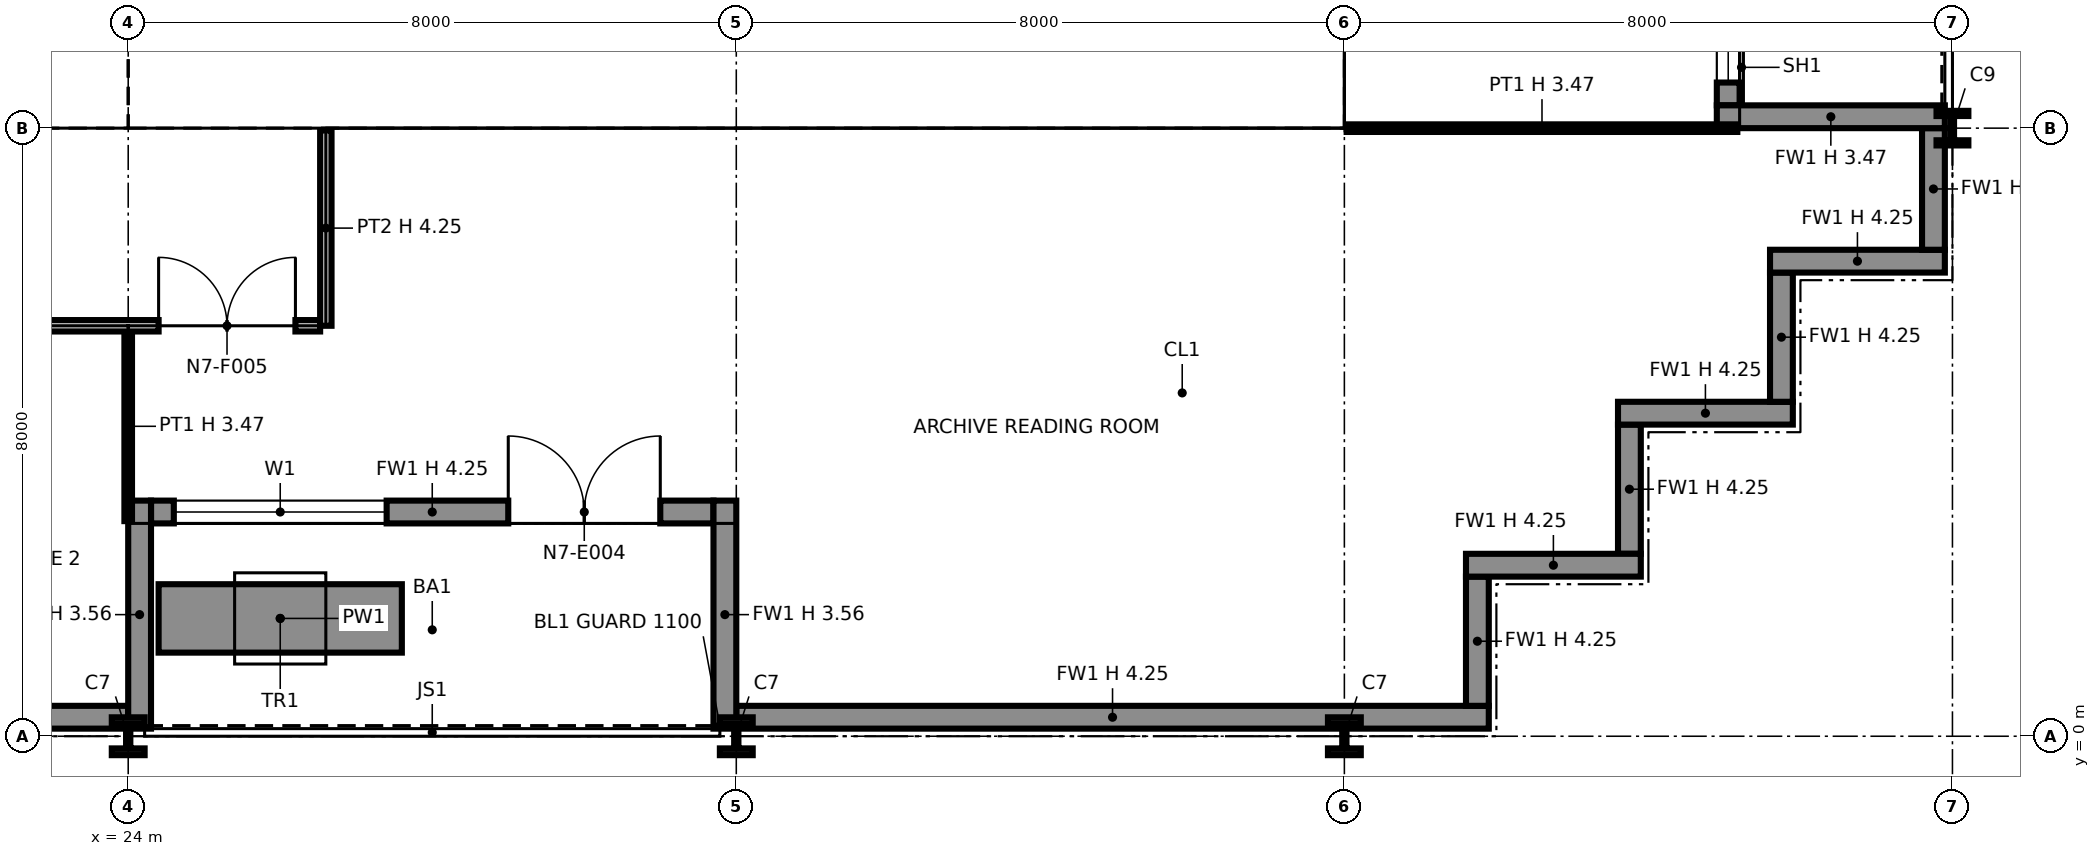
"""IFC4 building model, lengths in metres.
Left out: names, types, materials, properties, quantities, classifications, styles, units other than length and angle.
Written with IfcOpenShell. Run it as: python <this file> out.ifc"""

import sys

from ifc_helpers import new_model, si_unit, direction, frame, frame_2d, origin, origin_2d, place, context, subcontext, project, spatial, polyline, rectangle, i_section, outline, extrude, element, fill, save


model = new_model("IFC4")
c1 = context("Model", 3, precision=1e-05, world=origin(), true_north=direction((0.0, 1.0)))
c2 = subcontext(c1, "Body", "Model", "MODEL_VIEW")
j1 = project(units=[si_unit("LENGTHUNIT", "METRE"), si_unit("PLANEANGLEUNIT", "RADIAN")], contexts=[c1])
p1 = place(None, origin())
s1 = spatial("IfcSite", under=j1, at=p1, CompositionType="ELEMENT")
p2 = place(p1, origin())
s2 = spatial("IfcBuilding", under=s1, at=p2, CompositionType="ELEMENT")
p3 = place(p2, frame((0.0, 0.0, 105.2)))
s3 = spatial("IfcBuildingStorey", under=s2, at=p3, CompositionType="ELEMENT", Elevation=105.2)
p4 = place(p3, frame((24.0, 0.0, 0.0), z_axis=(0.0, 0.0, 1.0), x_axis=(1.0, 0.0, 0.0)))
e1 = element("IfcColumn", 1, at=p4, inside=s3, PredefinedType="COLUMN", context=c2, shape_type="SweptSolid", body=[
    extrude(i_section(OverallWidth=0.432, OverallDepth=0.498, WebThickness=0.056, FlangeThickness=0.089, at=origin_2d()), origin(), (0.0, 0.0, 1.0), 4.25),
])
p5 = place(p3, frame((24.0, 8.0, 0.0), z_axis=(0.0, 0.0, 1.0), x_axis=(1.0, 0.0, 0.0)))
e2 = element("IfcColumn", 2, at=p5, inside=s3, PredefinedType="COLUMN", context=c2, shape_type="SweptSolid", body=[
    extrude(i_section(OverallWidth=0.411, OverallDepth=0.434, WebThickness=0.036, FlangeThickness=0.057, at=origin_2d()), origin(), (0.0, 0.0, 1.0), 4.25),
])
p6 = place(p3, frame((32.0, 0.0, 0.0), z_axis=(0.0, 0.0, 1.0), x_axis=(1.0, 0.0, 0.0)))
e3 = element("IfcColumn", 3, at=p6, inside=s3, PredefinedType="COLUMN", context=c2, shape_type="SweptSolid", body=[
    extrude(i_section(OverallWidth=0.432, OverallDepth=0.498, WebThickness=0.056, FlangeThickness=0.089, at=origin_2d()), origin(), (0.0, 0.0, 1.0), 4.25),
])
p7 = place(p3, frame((32.0, 8.0, 0.0), z_axis=(0.0, 0.0, 1.0), x_axis=(1.0, 0.0, 0.0)))
e4 = element("IfcColumn", 4, at=p7, inside=s3, PredefinedType="COLUMN", context=c2, shape_type="SweptSolid", body=[
    extrude(i_section(OverallWidth=0.406, OverallDepth=0.417, WebThickness=0.03, FlangeThickness=0.048, at=origin_2d()), origin(), (0.0, 0.0, 1.0), 4.25),
])
p8 = place(p3, frame((40.0, 0.0, 0.0), z_axis=(0.0, 0.0, 1.0), x_axis=(1.0, 0.0, 0.0)))
e5 = element("IfcColumn", 5, at=p8, inside=s3, PredefinedType="COLUMN", context=c2, shape_type="SweptSolid", body=[
    extrude(i_section(OverallWidth=0.432, OverallDepth=0.498, WebThickness=0.056, FlangeThickness=0.089, at=origin_2d()), origin(), (0.0, 0.0, 1.0), 4.25),
])
p9 = place(p3, frame((40.0, 8.0, 0.0), z_axis=(0.0, 0.0, 1.0), x_axis=(1.0, 0.0, 0.0)))
e6 = element("IfcColumn", 6, at=p9, inside=s3, PredefinedType="COLUMN", context=c2, shape_type="SweptSolid", body=[
    extrude(i_section(OverallWidth=0.406, OverallDepth=0.417, WebThickness=0.03, FlangeThickness=0.048, at=origin_2d()), origin(), (0.0, 0.0, 1.0), 4.25),
])
p10 = place(p3, frame((48.0, 8.0, 0.0), z_axis=(0.0, 0.0, 1.0), x_axis=(1.0, 0.0, 0.0)))
e7 = element("IfcColumn", 7, at=p10, inside=s3, PredefinedType="COLUMN", context=c2, shape_type="SweptSolid", body=[
    extrude(i_section(OverallWidth=0.419, OverallDepth=0.455, WebThickness=0.042, FlangeThickness=0.068, at=origin_2d()), origin(), (0.0, 0.0, 1.0), 4.25),
])
p11 = place(p3, frame((16.0, 0.25, 0.0), z_axis=(0.0, 0.0, 1.0), x_axis=(1.0, 0.0, 0.0)))
e8 = element("IfcWall", 8, at=p11, inside=s3, PredefinedType="SOLIDWALL", context=c2, shape_type="SweptSolid", body=[
    extrude(rectangle(XDim=8.0, YDim=0.3, at=frame_2d((4.0, 0.0))), origin(), (0.0, 0.0, 1.0), 4.25),
])
p12 = place(p3, frame((24.3, 2.95, 0.0), z_axis=(0.0, 0.0, 1.0), x_axis=(1.0, 0.0, 0.0)))
e9 = element("IfcWall", 9, at=p12, inside=s3, PredefinedType="SOLIDWALL", context=c2, shape_type="SweptSolid", body=[
    extrude(rectangle(XDim=7.4, YDim=0.3, at=frame_2d((3.7, 0.0))), origin(), (0.0, 0.0, 1.0), 4.25),
])
p13 = place(p12, frame((0.3, 0.0, 0.9)))
e10 = element("IfcOpeningElement", 10, at=p13, cuts=e9, PredefinedType="OPENING", context=c2, shape_type="SweptSolid", body=[
    extrude(rectangle(XDim=2.8, YDim=2.2, at=frame_2d((1.4, 1.1))), frame((0.0, 0.16, 0.0), z_axis=(0.0, -1.0, 0.0), x_axis=(1.0, 0.0, 0.0)), (0.0, 0.0, 1.0), 0.32),
])
p14 = place(p12, frame((4.7, 0.0, 0.0)))
e11 = element("IfcOpeningElement", 11, at=p14, cuts=e9, PredefinedType="OPENING", context=c2, shape_type="SweptSolid", body=[
    extrude(rectangle(XDim=2.0, YDim=2.4, at=frame_2d((1.0, 1.2))), frame((0.0, 0.16, 0.0), z_axis=(0.0, -1.0, 0.0), x_axis=(1.0, 0.0, 0.0)), (0.0, 0.0, 1.0), 0.32),
])
for number, where, z_axis, x_axis in (
    (12, (24.15, 0.1, 0.0), (0.0, 0.0, 1.0), (0.0, 1.0, 0.0)),
    (13, (31.85, 0.1, 0.0), (0.0, 0.0, 1.0), (0.0, 1.0, 0.0)),
):
    element("IfcWall", number, at=place(p3, frame(where, z_axis=z_axis, x_axis=x_axis)), inside=s3, PredefinedType="SOLIDWALL", context=c2, shape_type="SweptSolid", body=[
        extrude(rectangle(XDim=3.0, YDim=0.3, at=frame_2d((1.5, 0.0))), origin(), (0.0, 0.0, 1.0), 3.556),
    ])
p15 = place(p3, frame((32.0, 0.25, 0.0), z_axis=(0.0, 0.0, 1.0), x_axis=(1.0, 0.0, 0.0)))
e14 = element("IfcWall", 14, at=p15, inside=s3, PredefinedType="SOLIDWALL", context=c2, shape_type="SweptSolid", body=[
    extrude(rectangle(XDim=9.9, YDim=0.3, at=frame_2d((4.95, 0.0))), origin(), (0.0, 0.0, 1.0), 4.25),
])
p16 = place(p3, frame((24.4, 1.55, 0.0), z_axis=(0.0, 0.0, 1.0), x_axis=(1.0, 0.0, 0.0)))
e15 = element("IfcWall", 15, at=p16, inside=s3, PredefinedType="SOLIDWALL", context=c2, shape_type="SweptSolid", body=[
    extrude(rectangle(XDim=3.2, YDim=0.9, at=frame_2d((1.6, 0.0))), origin(), (0.0, 0.0, 1.0), 0.6),
])
p17 = place(p3, frame((41.75, 0.4, 0.0), z_axis=(0.0, 0.0, 1.0), x_axis=(0.0, 1.0, 0.0)))
e16 = element("IfcWall", 16, at=p17, inside=s3, PredefinedType="SOLIDWALL", context=c2, shape_type="SweptSolid", body=[
    extrude(rectangle(XDim=1.7, YDim=0.3, at=frame_2d((0.85, 0.0))), origin(), (0.0, 0.0, 1.0), 4.25),
])
p18 = place(p3, frame((41.6, 2.25, 0.0), z_axis=(0.0, 0.0, 1.0), x_axis=(1.0, 0.0, 0.0)))
e17 = element("IfcWall", 17, at=p18, inside=s3, PredefinedType="SOLIDWALL", context=c2, shape_type="SweptSolid", body=[
    extrude(rectangle(XDim=2.3, YDim=0.3, at=frame_2d((1.15, 0.0))), origin(), (0.0, 0.0, 1.0), 4.25),
])
p19 = place(p3, frame((43.75, 2.4, 0.0), z_axis=(0.0, 0.0, 1.0), x_axis=(0.0, 1.0, 0.0)))
e18 = element("IfcWall", 18, at=p19, inside=s3, PredefinedType="SOLIDWALL", context=c2, shape_type="SweptSolid", body=[
    extrude(rectangle(XDim=1.7, YDim=0.3, at=frame_2d((0.85, 0.0))), origin(), (0.0, 0.0, 1.0), 4.25),
])
p20 = place(p3, frame((43.6, 4.25, 0.0), z_axis=(0.0, 0.0, 1.0), x_axis=(1.0, 0.0, 0.0)))
e19 = element("IfcWall", 19, at=p20, inside=s3, PredefinedType="SOLIDWALL", context=c2, shape_type="SweptSolid", body=[
    extrude(rectangle(XDim=2.3, YDim=0.3, at=frame_2d((1.15, 0.0))), origin(), (0.0, 0.0, 1.0), 4.25),
])
p21 = place(p3, frame((45.75, 4.4, 0.0), z_axis=(0.0, 0.0, 1.0), x_axis=(0.0, 1.0, 0.0)))
e20 = element("IfcWall", 20, at=p21, inside=s3, PredefinedType="SOLIDWALL", context=c2, shape_type="SweptSolid", body=[
    extrude(rectangle(XDim=1.7, YDim=0.3, at=frame_2d((0.85, 0.0))), origin(), (0.0, 0.0, 1.0), 4.25),
])
p22 = place(p3, frame((45.6, 6.25, 0.0), z_axis=(0.0, 0.0, 1.0), x_axis=(1.0, 0.0, 0.0)))
e21 = element("IfcWall", 21, at=p22, inside=s3, PredefinedType="SOLIDWALL", context=c2, shape_type="SweptSolid", body=[
    extrude(rectangle(XDim=2.3, YDim=0.3, at=frame_2d((1.15, 0.0))), origin(), (0.0, 0.0, 1.0), 4.25),
])
p23 = place(p3, frame((47.75, 6.4, 0.0), z_axis=(0.0, 0.0, 1.0), x_axis=(0.0, 1.0, 0.0)))
e22 = element("IfcWall", 22, at=p23, inside=s3, PredefinedType="SOLIDWALL", context=c2, shape_type="SweptSolid", body=[
    extrude(rectangle(XDim=1.6, YDim=0.3, at=frame_2d((0.8, 0.0))), origin(), (0.0, 0.0, 1.0), 4.25),
])
p24 = place(p3, frame((45.05, 8.3, 0.0), z_axis=(0.0, 0.0, 1.0), x_axis=(0.0, 1.0, 0.0)))
e23 = element("IfcWall", 23, at=p24, inside=s3, PredefinedType="SOLIDWALL", context=c2, shape_type="SweptSolid", body=[
    extrude(rectangle(XDim=7.4, YDim=0.3, at=frame_2d((3.7, 0.0))), origin(), (0.0, 0.0, 1.0), 4.25),
])
p25 = place(p24, frame((0.3, 0.0, 0.9)))
e24 = element("IfcOpeningElement", 24, at=p25, cuts=e23, PredefinedType="OPENING", context=c2, shape_type="SweptSolid", body=[
    extrude(rectangle(XDim=2.8, YDim=2.2, at=frame_2d((1.4, 1.1))), frame((0.0, 0.16, 0.0), z_axis=(0.0, -1.0, 0.0), x_axis=(1.0, 0.0, 0.0)), (0.0, 0.0, 1.0), 0.32),
])
p26 = place(p24, frame((4.7, 0.0, 0.0)))
e25 = element("IfcOpeningElement", 25, at=p26, cuts=e23, PredefinedType="OPENING", context=c2, shape_type="SweptSolid", body=[
    extrude(rectangle(XDim=2.0, YDim=2.4, at=frame_2d((1.0, 1.2))), frame((0.0, 0.16, 0.0), z_axis=(0.0, -1.0, 0.0), x_axis=(1.0, 0.0, 0.0)), (0.0, 0.0, 1.0), 0.32),
])
p27 = place(p3, frame((47.9, 8.15, 0.0), z_axis=(0.0, 0.0, 1.0), x_axis=(-1.0, 0.0, 0.0)))
e26 = element("IfcWall", 26, at=p27, inside=s3, PredefinedType="SOLIDWALL", context=c2, shape_type="SweptSolid", body=[
    extrude(rectangle(XDim=3.0, YDim=0.3, at=frame_2d((1.5, 0.0))), origin(), (0.0, 0.0, 1.0), 3.469),
])
p28 = place(p3, frame((8.65, 8.75, 0.0), z_axis=(0.0, 0.0, 1.0), x_axis=(1.0, 0.0, 0.0)))
e27 = element("IfcWall", 27, at=p28, inside=s3, PredefinedType="PARTITIONING", context=c2, shape_type="SweptSolid", body=[
    extrude(outline(polyline([(0.0, 0.0), (14.7, 0.0), (14.7, 4.25), (7.469, 4.25), (7.469, 3.632), (7.231, 3.632), (7.23, 4.25), (0.0, 4.25), (0.0, 0.0)])), frame((0.0, 0.1, 0.0), z_axis=(0.0, -1.0, 0.0), x_axis=(1.0, 0.0, 0.0)), (0.0, 0.0, 1.0), 0.2),
])
p29 = place(p28, frame((1.3, 0.0, 0.0)))
e28 = element("IfcOpeningElement", 28, at=p29, cuts=e27, PredefinedType="OPENING", context=c2, shape_type="SweptSolid", body=[
    extrude(rectangle(XDim=1.4, YDim=2.1, at=frame_2d((0.7, 1.05))), frame((0.0, 0.11, 0.0), z_axis=(0.0, -1.0, 0.0), x_axis=(1.0, 0.0, 0.0)), (0.0, 0.0, 1.0), 0.22),
])
p30 = place(p28, frame((4.6, 0.0, 0.0)))
e29 = element("IfcOpeningElement", 29, at=p30, cuts=e27, PredefinedType="OPENING", context=c2, shape_type="SweptSolid", body=[
    extrude(rectangle(XDim=1.4, YDim=2.1, at=frame_2d((0.7, 1.05))), frame((0.0, 0.11, 0.0), z_axis=(0.0, -1.0, 0.0), x_axis=(1.0, 0.0, 0.0)), (0.0, 0.0, 1.0), 0.22),
])
p31 = place(p28, frame((10.4, 0.0, 0.0)))
e30 = element("IfcOpeningElement", 30, at=p31, cuts=e27, PredefinedType="OPENING", context=c2, shape_type="SweptSolid", body=[
    extrude(rectangle(XDim=1.2, YDim=2.1, at=frame_2d((0.6, 1.05))), frame((0.0, 0.11, 0.0), z_axis=(0.0, -1.0, 0.0), x_axis=(1.0, 0.0, 0.0)), (0.0, 0.0, 1.0), 0.22),
])
p32 = place(p3, frame((23.25, 8.85, 0.0), z_axis=(0.0, 0.0, 1.0), x_axis=(0.0, 1.0, 0.0)))
e31 = element("IfcWall", 31, at=p32, inside=s3, PredefinedType="PARTITIONING", context=c2, shape_type="SweptSolid", body=[
    extrude(outline(polyline([(0.0, 0.0), (14.3, 0.0), (14.3, 4.25), (11.231, 4.25), (11.23, 3.789), (11.07, 3.789), (11.069, 4.25), (7.27, 4.25), (7.269, 3.632), (7.031, 3.632), (7.031, 4.25), (1.231, 4.25), (1.23, 3.789), (1.07, 3.789), (1.069, 4.25), (0.0, 4.25), (0.0, 0.0)])), frame((0.0, 0.1, 0.0), z_axis=(0.0, -1.0, 0.0), x_axis=(1.0, 0.0, 0.0)), (0.0, 0.0, 1.0), 0.2),
])
p33 = place(p32, frame((8.3, 0.0, 0.0)))
e32 = element("IfcOpeningElement", 32, at=p33, cuts=e31, PredefinedType="OPENING", context=c2, shape_type="SweptSolid", body=[
    extrude(rectangle(XDim=1.8, YDim=2.1, at=frame_2d((0.9, 1.05))), frame((0.0, 0.11, 0.0), z_axis=(0.0, -1.0, 0.0), x_axis=(1.0, 0.0, 0.0)), (0.0, 0.0, 1.0), 0.22),
])
p34 = place(p3, frame((24.65, 8.75, 0.0), z_axis=(0.0, 0.0, 1.0), x_axis=(1.0, 0.0, 0.0)))
e33 = element("IfcWall", 33, at=p34, inside=s3, PredefinedType="PARTITIONING", context=c2, shape_type="SweptSolid", body=[
    extrude(outline(polyline([(0.0, 0.0), (14.7, 0.0), (14.7, 4.25), (7.469, 4.25), (7.469, 3.632), (7.231, 3.632), (7.23, 4.25), (0.0, 4.25), (0.0, 0.0)])), frame((0.0, 0.1, 0.0), z_axis=(0.0, -1.0, 0.0), x_axis=(1.0, 0.0, 0.0)), (0.0, 0.0, 1.0), 0.2),
])
p35 = place(p3, frame((24.75, 8.85, 0.0), z_axis=(0.0, 0.0, 1.0), x_axis=(0.0, 1.0, 0.0)))
e34 = element("IfcWall", 34, at=p35, inside=s3, PredefinedType="PARTITIONING", context=c2, shape_type="SweptSolid", body=[
    extrude(outline(polyline([(0.0, 0.0), (6.3, 0.0), (6.3, 4.25), (3.231, 4.25), (3.23, 3.789), (3.07, 3.789), (3.069, 4.25), (0.0, 4.25), (0.0, 0.0)])), frame((0.0, 0.1, 0.0), z_axis=(0.0, -1.0, 0.0), x_axis=(1.0, 0.0, 0.0)), (0.0, 0.0, 1.0), 0.2),
])
for number, where, z_axis, x_axis in (
    (35, (27.075, 8.85, 0.0), (0.0, 0.0, 1.0), (0.0, 1.0, 0.0)),
    (36, (29.225, 8.85, 0.0), (0.0, 0.0, 1.0), (0.0, 1.0, 0.0)),
):
    element("IfcWall", number, at=place(p3, frame(where, z_axis=z_axis, x_axis=x_axis)), inside=s3, PredefinedType="PARTITIONING", context=c2, shape_type="SweptSolid", body=[
        extrude(rectangle(XDim=3.0, YDim=0.15, at=frame_2d((1.5, 0.0))), origin(), (0.0, 0.0, 1.0), 4.25),
    ])
p36 = place(p3, frame((32.0, 8.85, 0.0), z_axis=(0.0, 0.0, 1.0), x_axis=(0.0, 1.0, 0.0)))
e37 = element("IfcWall", 37, at=p36, inside=s3, PredefinedType="PARTITIONING", context=c2, shape_type="SweptSolid", body=[
    extrude(rectangle(XDim=3.0, YDim=0.6, at=frame_2d((1.5, 0.0))), origin(), (0.0, 0.0, 1.0), 3.632),
])
for number, where, z_axis, x_axis in (
    (38, (35.6, 8.85, 0.0), (0.0, 0.0, 1.0), (0.0, 1.0, 0.0)),
    (39, (39.25, 8.85, 0.0), (0.0, 0.0, 1.0), (0.0, 1.0, 0.0)),
):
    element("IfcWall", number, at=place(p3, frame(where, z_axis=z_axis, x_axis=x_axis)), inside=s3, PredefinedType="PARTITIONING", context=c2, shape_type="SweptSolid", body=[
        extrude(rectangle(XDim=6.3, YDim=0.2, at=frame_2d((3.15, 0.0))), origin(), (0.0, 0.0, 1.0), 4.25),
    ])
p37 = place(p3, frame((24.0, 2.83, 0.0), z_axis=(0.0, 0.0, 1.0), x_axis=(0.0, 1.0, 0.0)))
e40 = element("IfcWall", 40, at=p37, inside=s3, PredefinedType="PARTITIONING", context=c2, shape_type="SweptSolid", body=[
    extrude(rectangle(XDim=2.495, YDim=0.1, at=frame_2d((1.248, 0.0))), origin(), (0.0, 0.0, 1.0), 3.47),
])
p38 = place(p3, frame((5.475, 5.4, 0.0), z_axis=(0.0, 0.0, 1.0), x_axis=(1.0, 0.0, 0.0)))
e41 = element("IfcWall", 41, at=p38, inside=s3, PredefinedType="PARTITIONING", context=c2, shape_type="SweptSolid", body=[
    extrude(rectangle(XDim=21.05, YDim=0.15, at=frame_2d((10.525, 0.0))), origin(), (0.0, 0.0, 1.0), 4.25),
])
p39 = place(p38, frame((13.025, 0.0, 0.0), z_axis=(0.0, 0.0, 1.0), x_axis=(-1.0, 0.0, 0.0)))
e42 = element("IfcOpeningElement", 42, at=p39, cuts=e41, PredefinedType="OPENING", context=c2, shape_type="SweptSolid", body=[
    extrude(rectangle(XDim=1.0, YDim=2.1, at=frame_2d((0.5, 1.05))), frame((0.0, 0.085, 0.0), z_axis=(0.0, -1.0, 0.0), x_axis=(1.0, 0.0, 0.0)), (0.0, 0.0, 1.0), 0.17),
])
p40 = place(p38, frame((17.025, 0.0, 0.0), z_axis=(0.0, 0.0, 1.0), x_axis=(-1.0, 0.0, 0.0)))
e43 = element("IfcOpeningElement", 43, at=p40, cuts=e41, PredefinedType="OPENING", context=c2, shape_type="SweptSolid", body=[
    extrude(rectangle(XDim=1.0, YDim=2.1, at=frame_2d((0.5, 1.05))), frame((0.0, 0.085, 0.0), z_axis=(0.0, -1.0, 0.0), x_axis=(1.0, 0.0, 0.0)), (0.0, 0.0, 1.0), 0.17),
])
p41 = place(p38, frame((5.025, 0.0, 0.0), z_axis=(0.0, 0.0, 1.0), x_axis=(-1.0, 0.0, 0.0)))
e44 = element("IfcOpeningElement", 44, at=p41, cuts=e41, PredefinedType="OPENING", context=c2, shape_type="SweptSolid", body=[
    extrude(rectangle(XDim=1.0, YDim=2.1, at=frame_2d((0.5, 1.05))), frame((0.0, 0.085, 0.0), z_axis=(0.0, -1.0, 0.0), x_axis=(1.0, 0.0, 0.0)), (0.0, 0.0, 1.0), 0.17),
])
p42 = place(p38, frame((9.025, 0.0, 0.0), z_axis=(0.0, 0.0, 1.0), x_axis=(-1.0, 0.0, 0.0)))
e45 = element("IfcOpeningElement", 45, at=p42, cuts=e41, PredefinedType="OPENING", context=c2, shape_type="SweptSolid", body=[
    extrude(rectangle(XDim=1.0, YDim=2.1, at=frame_2d((0.5, 1.05))), frame((0.0, 0.085, 0.0), z_axis=(0.0, -1.0, 0.0), x_axis=(1.0, 0.0, 0.0)), (0.0, 0.0, 1.0), 0.17),
])
p43 = place(p38, frame((18.925, 0.0, 0.0)))
e46 = element("IfcOpeningElement", 46, at=p43, cuts=e41, PredefinedType="OPENING", context=c2, shape_type="SweptSolid", body=[
    extrude(rectangle(XDim=1.8, YDim=2.1, at=frame_2d((0.9, 1.05))), frame((0.0, 0.085, 0.0), z_axis=(0.0, -1.0, 0.0), x_axis=(1.0, 0.0, 0.0)), (0.0, 0.0, 1.0), 0.17),
])
p44 = place(p3, frame((26.6, 5.4, 0.0), z_axis=(0.0, 0.0, 1.0), x_axis=(0.0, 1.0, 0.0)))
e47 = element("IfcWall", 47, at=p44, inside=s3, PredefinedType="PARTITIONING", context=c2, shape_type="SweptSolid", body=[
    extrude(rectangle(XDim=2.57, YDim=0.15, at=frame_2d((1.285, 0.0))), origin(), (0.0, 0.0, 1.0), 4.25),
])
p45 = place(p3, frame((40.03, 8.0, 0.0), z_axis=(0.0, 0.0, 1.0), x_axis=(1.0, 0.0, 0.0)))
e48 = element("IfcWall", 48, at=p45, inside=s3, PredefinedType="PARTITIONING", context=c2, shape_type="SweptSolid", body=[
    extrude(rectangle(XDim=5.14, YDim=0.1, at=frame_2d((2.57, 0.0))), origin(), (0.0, 0.0, 1.0), 3.47),
])
p46 = place(p13, origin())
e49 = element("IfcWindow", 49, at=p46, inside=s3, PartitioningType="SINGLE_PANEL", PredefinedType="WINDOW", context=c2, shape_type="SweptSolid", body=[
    extrude(rectangle(XDim=2.8, YDim=2.2, at=frame_2d((1.4, 1.1))), frame((0.0, 0.03, 0.0), z_axis=(0.0, -1.0, 0.0), x_axis=(1.0, 0.0, 0.0)), (0.0, 0.0, 1.0), 0.06),
])
fill(e10, e49)
p47 = place(p14, origin())
e50 = element("IfcDoor", 50, at=p47, inside=s3, OperationType="DOUBLE_DOOR_SINGLE_SWING", PredefinedType="DOOR", context=c2, shape_type="SweptSolid", body=[
    extrude(rectangle(XDim=2.0, YDim=2.4, at=frame_2d((1.0, 1.2))), frame((0.0, 0.025, 0.0), z_axis=(0.0, -1.0, 0.0), x_axis=(1.0, 0.0, 0.0)), (0.0, 0.0, 1.0), 0.05),
])
fill(e11, e50)
p48 = place(p25, origin())
e51 = element("IfcWindow", 51, at=p48, inside=s3, PartitioningType="SINGLE_PANEL", PredefinedType="WINDOW", context=c2, shape_type="SweptSolid", body=[
    extrude(rectangle(XDim=2.8, YDim=2.2, at=frame_2d((1.4, 1.1))), frame((0.0, 0.03, 0.0), z_axis=(0.0, -1.0, 0.0), x_axis=(1.0, 0.0, 0.0)), (0.0, 0.0, 1.0), 0.06),
])
fill(e24, e51)
p49 = place(p43, origin())
e52 = element("IfcDoor", 52, at=p49, inside=s3, OperationType="DOUBLE_DOOR_SINGLE_SWING", PredefinedType="DOOR", context=c2, shape_type="SweptSolid", body=[
    extrude(rectangle(XDim=1.8, YDim=2.1, at=frame_2d((0.9, 1.05))), frame((0.0, 0.025, 0.0), z_axis=(0.0, -1.0, 0.0), x_axis=(1.0, 0.0, 0.0)), (0.0, 0.0, 1.0), 0.05),
])
fill(e46, e52)
save(model, sys.argv[1])
